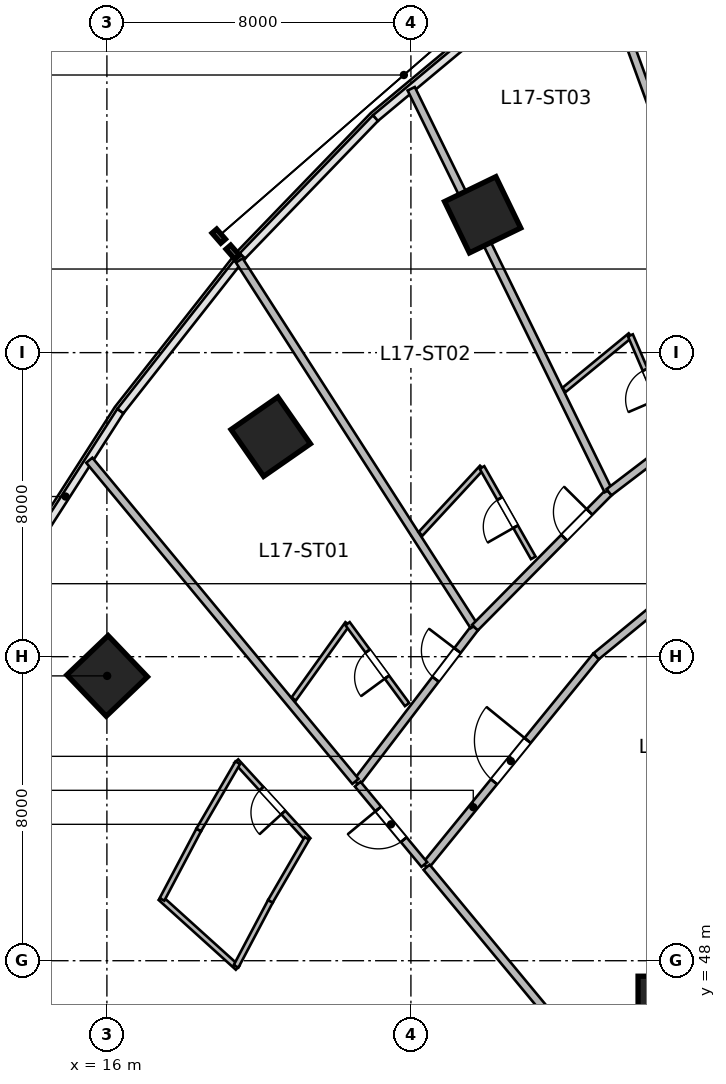
"""IFC4 building model, lengths in metres.
Left out: names, types, materials, properties, quantities, classifications, styles, units other than length and angle.
Written with IfcOpenShell. Run it as: python <this file> out.ifc"""

import sys

from ifc_helpers import new_model, si_unit, direction, frame, frame_2d, origin, origin_2d, place, context, subcontext, project, spatial, rectangle, circle, extrude, source, transform, mapped, element, fill, save


model = new_model("IFC4")
c1 = context("Model", 3, precision=1e-05, world=origin(), true_north=direction((0.0, 1.0)))
c2 = subcontext(c1, "Body", "Model", "MODEL_VIEW")
j1 = project(units=[si_unit("LENGTHUNIT", "METRE"), si_unit("PLANEANGLEUNIT", "RADIAN")], contexts=[c1])
p1 = place(None, origin())
s1 = spatial("IfcSite", under=j1, at=p1, CompositionType="ELEMENT")
p2 = place(p1, origin())
s2 = spatial("IfcBuilding", under=s1, at=p2, CompositionType="ELEMENT")
p3 = place(p2, frame((0.0, 0.0, 75.0)))
s3 = spatial("IfcBuildingStorey", under=s2, at=p3, CompositionType="ELEMENT", Elevation=75.0)
m1 = source(origin(), c2, "Body", "SweptSolid", [
    extrude(rectangle(XDim=1.5, YDim=1.5, at=origin_2d()), origin(), (0.0, 0.0, 1.0), 3.6),
])
p4 = place(p3, frame((16.007, 55.494, 0.0), z_axis=(0.0, 0.0, 1.0), x_axis=(-0.690756218984, 0.723087716626, 0.0)))
e1 = element("IfcColumn", 1, at=p4, inside=s3, PredefinedType="COLUMN", context=c2, shape_type="MappedRepresentation", body=[
    mapped(m1, transform((0.0, 0.0, 0.0), scale=1.0)),
])
m2 = source(origin(), c2, "Body", "SweptSolid", [
    extrude(circle(Radius=0.7, at=origin_2d()), origin(), (0.0, 0.0, 1.0), 3.6),
])
p5 = place(p3, frame((30.677, 46.892, 0.0), z_axis=(0.0, 0.0, 1.0), x_axis=(-0.571143442153, 0.820850271661, 0.0)))
e2 = element("IfcColumn", 2, at=p5, inside=s3, PredefinedType="COLUMN", context=c2, shape_type="MappedRepresentation", body=[
    mapped(m2, transform((0.0, 0.0, 0.0), scale=1.0)),
])
for number, where, z_axis, x_axis in (
    (3, (20.311, 61.789, 0.0), (0.0, 0.0, 1.0), (-0.571, 0.821, 0.0)),
    (4, (25.888, 67.627, 0.0), (0.0, 0.0, 1.0), (-0.436, 0.9, 0.0)),
):
    element("IfcColumn", number, at=place(p3, frame(where, z_axis=z_axis, x_axis=x_axis)), inside=s3, PredefinedType="COLUMN", context=c2, shape_type="MappedRepresentation", body=[
        mapped(m1, transform((0.0, 0.0, 0.0), scale=1.0)),
    ])
m3 = source(origin(), c2, "Body", "SweptSolid", [
    extrude(rectangle(XDim=7.113, YDim=0.21, at=frame_2d((3.556, 0.0))), origin(), (0.0, 0.0, 1.0), 3.36),
])
p6 = place(p3, frame((24.383, 50.495, 0.0), z_axis=(0.0, 0.0, 1.0), x_axis=(0.63149032532, 0.775383755974, 0.0)))
e5 = element("IfcWall", 5, at=p6, inside=s3, PredefinedType="PARTITIONING", context=c2, shape_type="MappedRepresentation", body=[
    mapped(m3, transform((0.0, 0.0, 0.0), scale=1.0)),
])
p7 = place(p6, frame((2.856, 0.0, 0.0)))
e6 = element("IfcOpeningElement", 6, at=p7, cuts=e5, PredefinedType="OPENING", context=c2, shape_type="SweptSolid", body=[
    extrude(rectangle(XDim=1.4, YDim=2.15, at=frame_2d((0.7, 1.075))), frame((0.0, 0.115, 0.0), z_axis=(0.0, -1.0, 0.0), x_axis=(1.0, 0.0, 0.0)), (0.0, 0.0, 1.0), 0.23),
])
m4 = source(origin(), c2, "Body", "SweptSolid", [
    extrude(rectangle(XDim=6.721, YDim=0.21, at=frame_2d((3.361, 0.0))), origin(), (0.0, 0.0, 1.0), 3.36),
])
p8 = place(p3, frame((28.874, 56.01, 0.0), z_axis=(0.0, 0.0, 1.0), x_axis=(0.772828051199, 0.63461547671, 0.0)))
e7 = element("IfcWall", 7, at=p8, inside=s3, PredefinedType="PARTITIONING", context=c2, shape_type="MappedRepresentation", body=[
    mapped(m4, transform((0.0, 0.0, 0.0), scale=1.0)),
])
m5 = source(origin(), c2, "Body", "SweptSolid", [
    extrude(rectangle(XDim=11.053, YDim=0.21, at=frame_2d((5.527, 0.0))), origin(), (0.0, 0.0, 1.0), 3.36),
])
p9 = place(p3, frame((31.466, 41.949, 0.0), z_axis=(0.0, 0.0, 1.0), x_axis=(-0.638131235571, 0.769927611005, 0.0)))
e8 = element("IfcWall", 8, at=p9, inside=s3, PredefinedType="PARTITIONING", context=c2, shape_type="MappedRepresentation", body=[
    mapped(m5, transform((0.0, 0.0, 0.0), scale=1.0)),
])
m6 = source(origin(), c2, "Body", "SweptSolid", [
    extrude(rectangle(XDim=5.135, YDim=0.21, at=frame_2d((2.567, 0.0))), origin(), (0.0, 0.0, 1.0), 3.36),
])
p10 = place(p3, frame((22.57, 52.683, 0.0), z_axis=(0.0, 0.0, 1.0), x_axis=(0.606802199649, 0.794852873494, 0.0)))
e9 = element("IfcWall", 9, at=p10, inside=s3, PredefinedType="PARTITIONING", context=c2, shape_type="MappedRepresentation", body=[
    mapped(m6, transform((0.0, 0.0, 0.0), scale=1.0)),
])
p11 = place(p10, frame((3.427, 0.0, 0.0)))
e10 = element("IfcOpeningElement", 10, at=p11, cuts=e9, PredefinedType="OPENING", context=c2, shape_type="SweptSolid", body=[
    extrude(rectangle(XDim=0.95, YDim=2.15, at=frame_2d((0.475, 1.075))), frame((0.0, 0.115, 0.0), z_axis=(0.0, -1.0, 0.0), x_axis=(1.0, 0.0, 0.0)), (0.0, 0.0, 1.0), 0.23),
])
m7 = source(origin(), c2, "Body", "SweptSolid", [
    extrude(rectangle(XDim=10.975, YDim=0.21, at=frame_2d((5.487, 0.0))), origin(), (0.0, 0.0, 1.0), 3.36),
])
p12 = place(p3, frame((22.54, 52.719, 0.0), z_axis=(0.0, 0.0, 1.0), x_axis=(-0.638125265812, 0.769932558821, 0.0)))
e11 = element("IfcWall", 11, at=p12, inside=s3, PredefinedType="PARTITIONING", context=c2, shape_type="MappedRepresentation", body=[
    mapped(m7, transform((0.0, 0.0, 0.0), scale=1.0)),
])
m8 = source(origin(), c2, "Body", "SweptSolid", [
    extrude(rectangle(XDim=11.432, YDim=0.21, at=frame_2d((5.716, 0.0))), origin(), (0.0, 0.0, 1.0), 3.36),
])
p13 = place(p3, frame((25.659, 56.805, 0.0), z_axis=(0.0, 0.0, 1.0), x_axis=(-0.540196183124, 0.841539115988, 0.0)))
e12 = element("IfcWall", 12, at=p13, inside=s3, PredefinedType="PARTITIONING", context=c2, shape_type="MappedRepresentation", body=[
    mapped(m8, transform((0.0, 0.0, 0.0), scale=1.0)),
])
m9 = source(origin(), c2, "Body", "SweptSolid", [
    extrude(rectangle(XDim=2.437, YDim=0.14, at=frame_2d((1.218, 0.0))), origin(), (0.0, 0.0, 1.0), 3.36),
])
p14 = place(p3, frame((20.915, 54.886, 0.0), z_axis=(0.0, 0.0, 1.0), x_axis=(0.581797219134, 0.813333877204, 0.0)))
e13 = element("IfcWall", 13, at=p14, inside=s3, PredefinedType="PARTITIONING", context=c2, shape_type="MappedRepresentation", body=[
    mapped(m9, transform((0.0, 0.0, 0.0), scale=1.0)),
])
m10 = source(origin(), c2, "Body", "SweptSolid", [
    extrude(rectangle(XDim=2.642, YDim=0.14, at=frame_2d((1.321, 0.0))), origin(), (0.0, 0.0, 1.0), 3.36),
])
p15 = place(p3, frame((23.899, 54.741, 0.0), z_axis=(0.0, 0.0, 1.0), x_axis=(-0.592789122423, 0.805357719487, 0.0)))
e14 = element("IfcWall", 14, at=p15, inside=s3, PredefinedType="PARTITIONING", context=c2, shape_type="MappedRepresentation", body=[
    mapped(m10, transform((0.0, 0.0, 0.0), scale=1.0)),
])
p16 = place(p15, frame((0.896, 0.0, 0.0)))
e15 = element("IfcOpeningElement", 15, at=p16, cuts=e14, PredefinedType="OPENING", context=c2, shape_type="SweptSolid", body=[
    extrude(rectangle(XDim=0.85, YDim=2.05, at=frame_2d((0.425, 1.025))), frame((0.0, 0.08, 0.0), z_axis=(0.0, -1.0, 0.0), x_axis=(1.0, 0.0, 0.0)), (0.0, 0.0, 1.0), 0.16),
])
m11 = source(origin(), c2, "Body", "SweptSolid", [
    extrude(rectangle(XDim=5.012, YDim=0.21, at=frame_2d((2.506, 0.0))), origin(), (0.0, 0.0, 1.0), 3.36),
])
p17 = place(p3, frame((25.685, 56.764, 0.0), z_axis=(0.0, 0.0, 1.0), x_axis=(0.703664626435, 0.710532260707, 0.0)))
e16 = element("IfcWall", 16, at=p17, inside=s3, PredefinedType="PARTITIONING", context=c2, shape_type="MappedRepresentation", body=[
    mapped(m11, transform((0.0, 0.0, 0.0), scale=1.0)),
])
p18 = place(p17, frame((3.335, 0.0, 0.0)))
e17 = element("IfcOpeningElement", 17, at=p18, cuts=e16, PredefinedType="OPENING", context=c2, shape_type="SweptSolid", body=[
    extrude(rectangle(XDim=0.95, YDim=2.15, at=frame_2d((0.475, 1.075))), frame((0.0, 0.115, 0.0), z_axis=(0.0, -1.0, 0.0), x_axis=(1.0, 0.0, 0.0)), (0.0, 0.0, 1.0), 0.23),
])
m12 = source(origin(), c2, "Body", "SweptSolid", [
    extrude(rectangle(XDim=11.775, YDim=0.21, at=frame_2d((5.887, 0.0))), origin(), (0.0, 0.0, 1.0), 2.644),
])
p19 = place(p3, frame((29.19, 60.371, 0.0), z_axis=(0.0, 0.0, 1.0), x_axis=(-0.4401500056, 0.897924257702, 0.0)))
e18 = element("IfcWall", 18, at=p19, inside=s3, PredefinedType="PARTITIONING", context=c2, shape_type="MappedRepresentation", body=[
    mapped(m12, transform((0.0, 0.0, 0.0), scale=1.0)),
])
m13 = source(origin(), c2, "Body", "SweptSolid", [
    extrude(rectangle(XDim=2.38, YDim=0.14, at=frame_2d((1.19, 0.0))), origin(), (0.0, 0.0, 1.0), 3.36),
])
p20 = place(p3, frame((24.253, 59.231, 0.0), z_axis=(0.0, 0.0, 1.0), x_axis=(0.679084816758, 0.734059814762, 0.0)))
e19 = element("IfcWall", 19, at=p20, inside=s3, PredefinedType="PARTITIONING", context=c2, shape_type="MappedRepresentation", body=[
    mapped(m13, transform((0.0, 0.0, 0.0), scale=1.0)),
])
m14 = source(origin(), c2, "Body", "SweptSolid", [
    extrude(rectangle(XDim=2.735, YDim=0.14, at=frame_2d((1.367, 0.0))), origin(), (0.0, 0.0, 1.0), 3.36),
])
p21 = place(p3, frame((27.219, 58.6, 0.0), z_axis=(0.0, 0.0, 1.0), x_axis=(-0.493694940578, 0.869635156631, 0.0)))
e20 = element("IfcWall", 20, at=p21, inside=s3, PredefinedType="PARTITIONING", context=c2, shape_type="MappedRepresentation", body=[
    mapped(m14, transform((0.0, 0.0, 0.0), scale=1.0)),
])
p22 = place(p21, frame((0.942, 0.0, 0.0)))
e21 = element("IfcOpeningElement", 21, at=p22, cuts=e20, PredefinedType="OPENING", context=c2, shape_type="SweptSolid", body=[
    extrude(rectangle(XDim=0.85, YDim=2.05, at=frame_2d((0.425, 1.025))), frame((0.0, 0.08, 0.0), z_axis=(0.0, -1.0, 0.0), x_axis=(1.0, 0.0, 0.0)), (0.0, 0.0, 1.0), 0.16),
])
m15 = source(origin(), c2, "Body", "SweptSolid", [
    extrude(rectangle(XDim=4.762, YDim=0.21, at=frame_2d((2.381, 0.0))), origin(), (0.0, 0.0, 1.0), 3.36),
])
p23 = place(p3, frame((29.212, 60.326, 0.0), z_axis=(0.0, 0.0, 1.0), x_axis=(0.795070295872, 0.60651729128, 0.0)))
e22 = element("IfcWall", 22, at=p23, inside=s3, PredefinedType="PARTITIONING", context=c2, shape_type="MappedRepresentation", body=[
    mapped(m15, transform((0.0, 0.0, 0.0), scale=1.0)),
])
p24 = place(p23, frame((3.144, 0.0, 0.0)))
e23 = element("IfcOpeningElement", 23, at=p24, cuts=e22, PredefinedType="OPENING", context=c2, shape_type="SweptSolid", body=[
    extrude(rectangle(XDim=0.95, YDim=2.15, at=frame_2d((0.475, 1.075))), frame((0.0, 0.115, 0.0), z_axis=(0.0, -1.0, 0.0), x_axis=(1.0, 0.0, 0.0)), (0.0, 0.0, 1.0), 0.23),
])
m16 = source(origin(), c2, "Body", "SweptSolid", [
    extrude(rectangle(XDim=12.088, YDim=0.21, at=frame_2d((6.044, 0.0))), origin(), (0.0, 0.0, 1.0), 3.36),
])
p25 = place(p3, frame((32.981, 63.262, 0.0), z_axis=(0.0, 0.0, 1.0), x_axis=(-0.34203007529, 0.939689005787, 0.0)))
e24 = element("IfcWall", 24, at=p25, inside=s3, PredefinedType="PARTITIONING", context=c2, shape_type="MappedRepresentation", body=[
    mapped(m16, transform((0.0, 0.0, 0.0), scale=1.0)),
])
m17 = source(origin(), c2, "Body", "SweptSolid", [
    extrude(rectangle(XDim=2.26, YDim=0.14, at=frame_2d((1.13, 0.0))), origin(), (0.0, 0.0, 1.0), 3.36),
])
p26 = place(p3, frame((28.029, 63.02, 0.0), z_axis=(0.0, 0.0, 1.0), x_axis=(0.772646789219, 0.634836151388, 0.0)))
e25 = element("IfcWall", 25, at=p26, inside=s3, PredefinedType="PARTITIONING", context=c2, shape_type="MappedRepresentation", body=[
    mapped(m17, transform((0.0, 0.0, 0.0), scale=1.0)),
])
m18 = source(origin(), c2, "Body", "SweptSolid", [
    extrude(rectangle(XDim=2.819, YDim=0.14, at=frame_2d((1.409, 0.0))), origin(), (0.0, 0.0, 1.0), 3.36),
])
p27 = place(p3, frame((30.888, 61.864, 0.0), z_axis=(0.0, 0.0, 1.0), x_axis=(-0.394420979357, 0.918929861874, 0.0)))
e26 = element("IfcWall", 26, at=p27, inside=s3, PredefinedType="PARTITIONING", context=c2, shape_type="MappedRepresentation", body=[
    mapped(m18, transform((0.0, 0.0, 0.0), scale=1.0)),
])
p28 = place(p27, frame((0.984, 0.0, 0.0)))
e27 = element("IfcOpeningElement", 27, at=p28, cuts=e26, PredefinedType="OPENING", context=c2, shape_type="SweptSolid", body=[
    extrude(rectangle(XDim=0.85, YDim=2.05, at=frame_2d((0.425, 1.025))), frame((0.0, 0.08, 0.0), z_axis=(0.0, -1.0, 0.0), x_axis=(1.0, 0.0, 0.0)), (0.0, 0.0, 1.0), 0.16),
])
m19 = source(origin(), c2, "Body", "SweptSolid", [
    extrude(rectangle(XDim=2.748, YDim=0.195, at=frame_2d((1.374, 0.0))), origin(), (0.0, 0.0, 1.0), 3.36),
])
p29 = place(p3, frame((24.353, 50.531, 0.0), z_axis=(0.0, 0.0, 1.0), x_axis=(-0.638111168284, 0.769944242729, 0.0)))
e28 = element("IfcWall", 28, at=p29, inside=s3, PredefinedType="PARTITIONING", context=c2, shape_type="MappedRepresentation", body=[
    mapped(m19, transform((0.0, 0.0, 0.0), scale=1.0)),
])
p30 = place(p29, frame((0.849, 0.0, 0.0)))
e29 = element("IfcOpeningElement", 29, at=p30, cuts=e28, PredefinedType="OPENING", context=c2, shape_type="SweptSolid", body=[
    extrude(rectangle(XDim=1.05, YDim=2.15, at=frame_2d((0.525, 1.075))), frame((0.0, 0.107, 0.0), z_axis=(0.0, -1.0, 0.0), x_axis=(1.0, 0.0, 0.0)), (0.0, 0.0, 1.0), 0.215),
])
m20 = source(origin(), c2, "Body", "SweptSolid", [
    extrude(rectangle(XDim=2.812, YDim=0.14, at=frame_2d((1.406, 0.0))), origin(), (0.0, 0.0, 1.0), 3.36),
])
p31 = place(p3, frame((21.303, 51.177, 0.0), z_axis=(0.0, 0.0, 1.0), x_axis=(-0.675119025852, 0.737708818527, 0.0)))
e30 = element("IfcWall", 30, at=p31, inside=s3, PredefinedType="PARTITIONING", context=c2, shape_type="MappedRepresentation", body=[
    mapped(m20, transform((0.0, 0.0, 0.0), scale=1.0)),
])
p32 = place(p31, frame((0.981, 0.0, 0.0)))
e31 = element("IfcOpeningElement", 31, at=p32, cuts=e30, PredefinedType="OPENING", context=c2, shape_type="SweptSolid", body=[
    extrude(rectangle(XDim=0.85, YDim=2.05, at=frame_2d((0.425, 1.025))), frame((0.0, 0.08, 0.0), z_axis=(0.0, -1.0, 0.0), x_axis=(1.0, 0.0, 0.0)), (0.0, 0.0, 1.0), 0.16),
])
m21 = source(origin(), c2, "Body", "SweptSolid", [
    extrude(rectangle(XDim=2.738, YDim=0.14, at=frame_2d((1.369, 0.0))), origin(), (0.0, 0.0, 1.0), 3.36),
])
p33 = place(p3, frame((19.44, 47.814, 0.0), z_axis=(0.0, 0.0, 1.0), x_axis=(-0.741873676582, 0.670539669218, 0.0)))
e32 = element("IfcWall", 32, at=p33, inside=s3, PredefinedType="PARTITIONING", context=c2, shape_type="MappedRepresentation", body=[
    mapped(m21, transform((0.0, 0.0, 0.0), scale=1.0)),
])
m22 = source(origin(), c2, "Body", "SweptSolid", [
    extrude(rectangle(XDim=1.936, YDim=0.14, at=frame_2d((0.968, 0.0))), origin(), (0.0, 0.0, 1.0), 3.36),
])
p34 = place(p3, frame((19.398, 47.852, 0.0), z_axis=(0.0, 0.0, 1.0), x_axis=(0.467174971862, 0.884164886017, 0.0)))
e33 = element("IfcWall", 33, at=p34, inside=s3, PredefinedType="PARTITIONING", context=c2, shape_type="MappedRepresentation", body=[
    mapped(m22, transform((0.0, 0.0, 0.0), scale=1.0)),
])
m23 = source(origin(), c2, "Body", "SweptSolid", [
    extrude(rectangle(XDim=2.068, YDim=0.14, at=frame_2d((1.034, 0.0))), origin(), (0.0, 0.0, 1.0), 3.36),
])
p35 = place(p3, frame((17.45, 49.612, 0.0), z_axis=(0.0, 0.0, 1.0), x_axis=(0.467215057643, 0.884143704333, 0.0)))
e34 = element("IfcWall", 34, at=p35, inside=s3, PredefinedType="PARTITIONING", context=c2, shape_type="MappedRepresentation", body=[
    mapped(m23, transform((0.0, 0.0, 0.0), scale=1.0)),
])
m24 = source(origin(), c2, "Body", "SweptSolid", [
    extrude(rectangle(XDim=1.914, YDim=0.14, at=frame_2d((0.957, 0.0))), origin(), (0.0, 0.0, 1.0), 3.36),
])
p36 = place(p3, frame((20.303, 49.563, 0.0), z_axis=(0.0, 0.0, 1.0), x_axis=(0.502347790612, 0.864665656347, 0.0)))
e35 = element("IfcWall", 35, at=p36, inside=s3, PredefinedType="PARTITIONING", context=c2, shape_type="MappedRepresentation", body=[
    mapped(m24, transform((0.0, 0.0, 0.0), scale=1.0)),
])
m25 = source(origin(), c2, "Body", "SweptSolid", [
    extrude(rectangle(XDim=2.045, YDim=0.14, at=frame_2d((1.022, 0.0))), origin(), (0.0, 0.0, 1.0), 3.36),
])
p37 = place(p3, frame((18.416, 51.441, 0.0), z_axis=(0.0, 0.0, 1.0), x_axis=(0.5023112139, 0.864686905411, 0.0)))
e36 = element("IfcWall", 36, at=p37, inside=s3, PredefinedType="PARTITIONING", context=c2, shape_type="MappedRepresentation", body=[
    mapped(m25, transform((0.0, 0.0, 0.0), scale=1.0)),
])
m26 = source(origin(), c2, "Body", "SweptSolid", [
    extrude(rectangle(XDim=1.4, YDim=2.15, at=frame_2d((0.7, 1.075))), frame((0.0, 0.025, 0.0), z_axis=(0.0, -1.0, 0.0), x_axis=(1.0, 0.0, 0.0)), (0.0, 0.0, 1.0), 0.05),
])
p38 = place(p7, origin())
e37 = element("IfcDoor", 37, at=p38, inside=s3, OperationType="SINGLE_SWING_RIGHT", PredefinedType="DOOR", context=c2, shape_type="MappedRepresentation", body=[
    mapped(m26, transform((0.0, 0.0, 0.0), scale=1.0)),
])
fill(e6, e37)
m27 = source(origin(), c2, "Body", "SweptSolid", [
    extrude(rectangle(XDim=0.95, YDim=2.15, at=frame_2d((0.475, 1.075))), frame((0.0, 0.025, 0.0), z_axis=(0.0, -1.0, 0.0), x_axis=(1.0, 0.0, 0.0)), (0.0, 0.0, 1.0), 0.05),
])
p39 = place(p11, origin())
e38 = element("IfcDoor", 38, at=p39, inside=s3, OperationType="SINGLE_SWING_RIGHT", PredefinedType="DOOR", context=c2, shape_type="MappedRepresentation", body=[
    mapped(m27, transform((0.0, 0.0, 0.0), scale=1.0)),
])
fill(e10, e38)
m28 = source(origin(), c2, "Body", "SweptSolid", [
    extrude(rectangle(XDim=0.85, YDim=2.05, at=frame_2d((0.425, 1.025))), frame((0.0, 0.025, 0.0), z_axis=(0.0, -1.0, 0.0), x_axis=(1.0, 0.0, 0.0)), (0.0, 0.0, 1.0), 0.05),
])
p40 = place(p16, origin())
e39 = element("IfcDoor", 39, at=p40, inside=s3, OperationType="SINGLE_SWING_LEFT", PredefinedType="DOOR", context=c2, shape_type="MappedRepresentation", body=[
    mapped(m28, transform((0.0, 0.0, 0.0), scale=1.0)),
])
fill(e15, e39)
p41 = place(p18, origin())
e40 = element("IfcDoor", 40, at=p41, inside=s3, OperationType="SINGLE_SWING_RIGHT", PredefinedType="DOOR", context=c2, shape_type="MappedRepresentation", body=[
    mapped(m27, transform((0.0, 0.0, 0.0), scale=1.0)),
])
fill(e17, e40)
p42 = place(p22, origin())
e41 = element("IfcDoor", 41, at=p42, inside=s3, OperationType="SINGLE_SWING_LEFT", PredefinedType="DOOR", context=c2, shape_type="MappedRepresentation", body=[
    mapped(m28, transform((0.0, 0.0, 0.0), scale=1.0)),
])
fill(e21, e41)
p43 = place(p28, origin())
e42 = element("IfcDoor", 42, at=p43, inside=s3, OperationType="SINGLE_SWING_LEFT", PredefinedType="DOOR", context=c2, shape_type="MappedRepresentation", body=[
    mapped(m28, transform((0.0, 0.0, 0.0), scale=1.0)),
])
fill(e27, e42)
m29 = source(origin(), c2, "Body", "SweptSolid", [
    extrude(rectangle(XDim=1.05, YDim=2.15, at=frame_2d((0.525, 1.075))), frame((0.0, 0.025, 0.0), z_axis=(0.0, -1.0, 0.0), x_axis=(1.0, 0.0, 0.0)), (0.0, 0.0, 1.0), 0.05),
])
p44 = place(p30, origin())
e43 = element("IfcDoor", 43, at=p44, inside=s3, OperationType="SINGLE_SWING_RIGHT", PredefinedType="DOOR", context=c2, shape_type="MappedRepresentation", body=[
    mapped(m29, transform((0.0, 0.0, 0.0), scale=1.0)),
])
fill(e29, e43)
p45 = place(p32, origin())
e44 = element("IfcDoor", 44, at=p45, inside=s3, OperationType="SINGLE_SWING_LEFT", PredefinedType="DOOR", context=c2, shape_type="MappedRepresentation", body=[
    mapped(m28, transform((0.0, 0.0, 0.0), scale=1.0)),
])
fill(e31, e44)
save(model, sys.argv[1])
